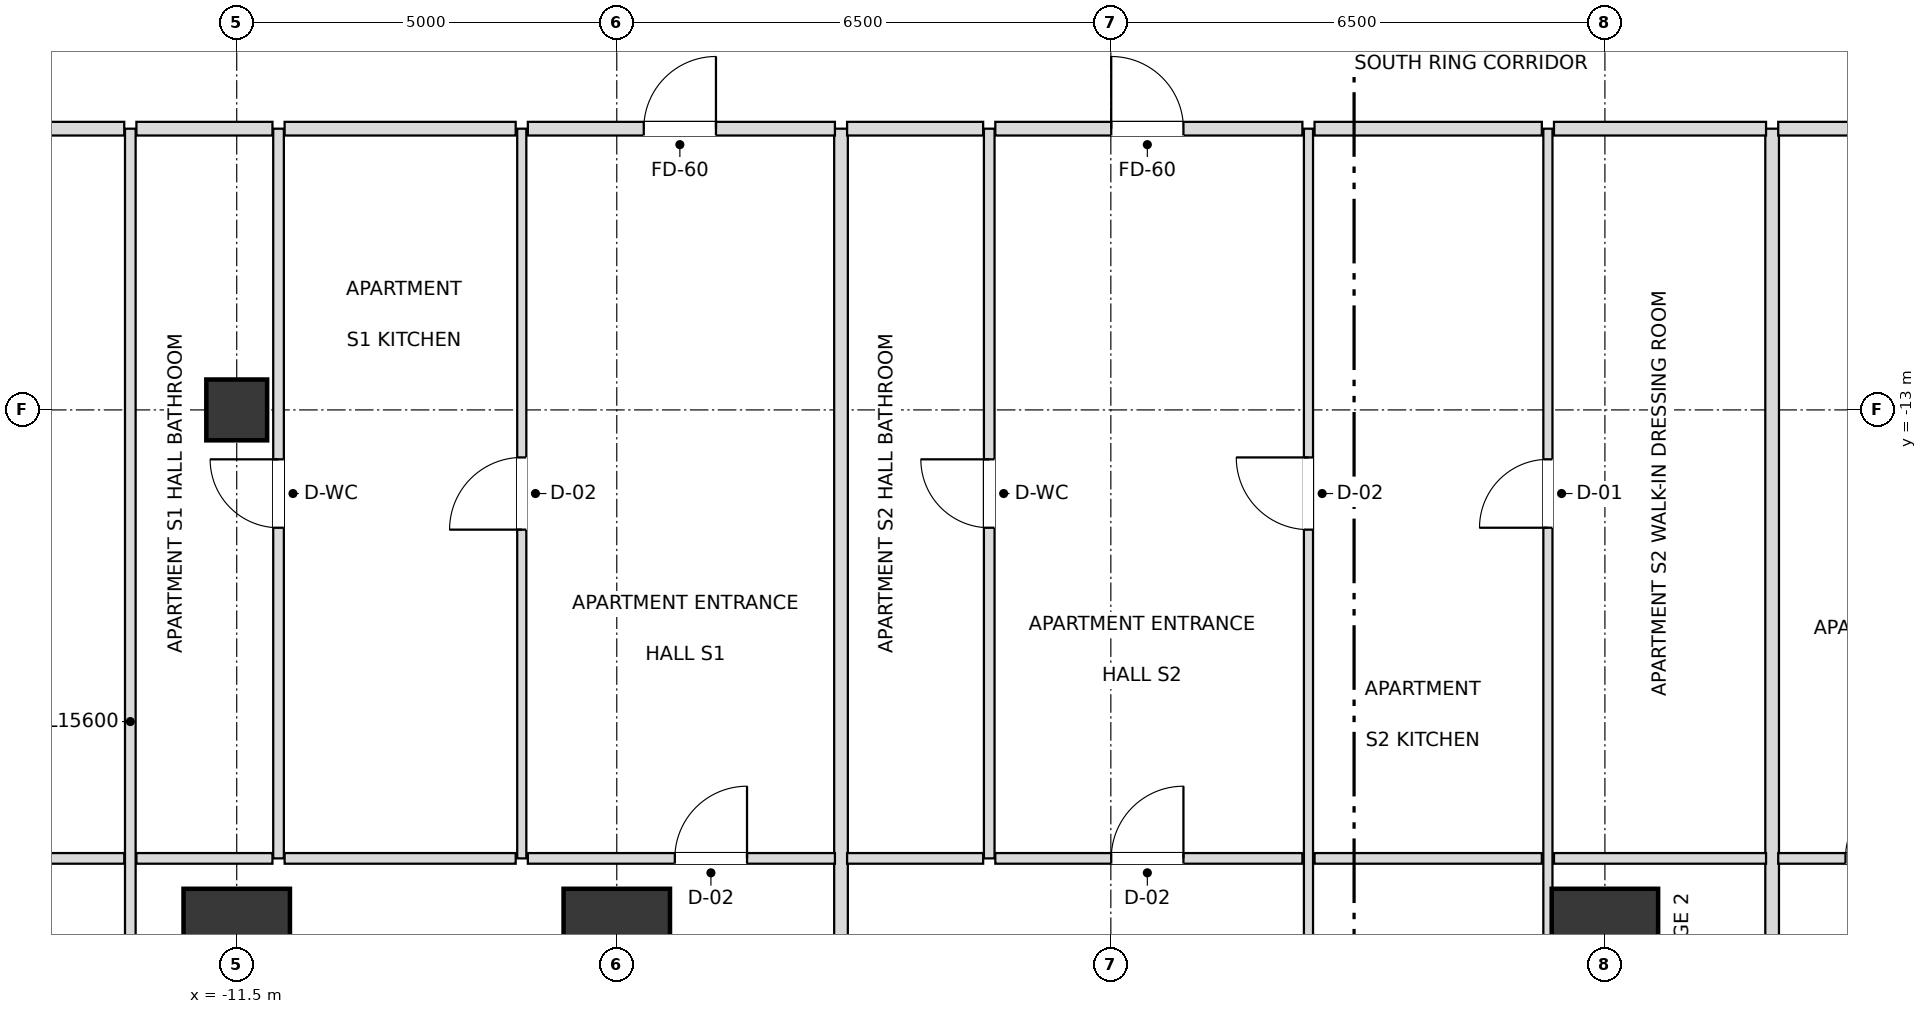
"""IFC4 building model, lengths in metres.
Left out: names, types, materials, properties, quantities, classifications, styles, units other than length and angle.
Written with IfcOpenShell. Run it as: python <this file> out.ifc"""

import sys

from ifc_helpers import new_model, si_unit, direction, frame, frame_2d, origin, origin_2d, place, context, subcontext, project, spatial, rectangle, extrude, element, fill, save


model = new_model("IFC4")
c1 = context("Model", 3, precision=1e-05, world=origin(), true_north=direction((0.0, 1.0)))
c2 = subcontext(c1, "Body", "Model", "MODEL_VIEW")
j1 = project(units=[si_unit("LENGTHUNIT", "METRE"), si_unit("PLANEANGLEUNIT", "RADIAN")], contexts=[c1])
p1 = place(None, origin())
s1 = spatial("IfcSite", under=j1, at=p1, CompositionType="ELEMENT")
p2 = place(p1, origin())
s2 = spatial("IfcBuilding", under=s1, at=p2, CompositionType="ELEMENT")
p3 = place(p2, frame((0.0, 0.0, 39.6)))
s3 = spatial("IfcBuildingStorey", under=s2, at=p3, CompositionType="ELEMENT", Elevation=39.6)
for number, where, z_axis, x_axis in (
    (1, (-11.5, -20.0, 0.0), (0.0, 0.0, 1.0), (1.0, 0.0, 0.0)),
    (2, (-6.5, -20.0, 0.0), (0.0, 0.0, 1.0), (1.0, 0.0, 0.0)),
    (3, (6.5, -20.0, 0.0), (0.0, 0.0, 1.0), (1.0, 0.0, 0.0)),
):
    element("IfcColumn", number, at=place(p3, frame(where, z_axis=z_axis, x_axis=x_axis)), inside=s3, PredefinedType="USERDEFINED", context=c2, shape_type="SweptSolid", body=[
        extrude(rectangle(XDim=1.4, YDim=1.4, at=origin_2d()), origin(), (0.0, 0.0, 1.0), 3.6),
    ])
p4 = place(p3, frame((-11.5, -13.0, 0.0), z_axis=(0.0, 0.0, 1.0), x_axis=(1.0, 0.0, 0.0)))
e4 = element("IfcColumn", 4, at=p4, inside=s3, PredefinedType="COLUMN", context=c2, shape_type="SweptSolid", body=[
    extrude(rectangle(XDim=0.8, YDim=0.8, at=origin_2d()), origin(), (0.0, 0.0, 1.0), 3.6),
])
p5 = place(p3, frame((-12.9, -24.9, 0.0), z_axis=(0.0, 0.0, 1.0), x_axis=(0.0, 1.0, 0.0)))
e5 = element("IfcWall", 5, at=p5, inside=s3, PredefinedType="PARTITIONING", context=c2, shape_type="SweptSolid", body=[
    extrude(rectangle(XDim=15.6, YDim=0.14, at=frame_2d((7.8, 0.0))), origin(), (0.0, 0.0, 1.0), 2.736),
])
p6 = place(p5, frame((2.55, 0.0, 0.0)))
e6 = element("IfcOpeningElement", 6, at=p6, cuts=e5, PredefinedType="OPENING", context=c2, shape_type="SweptSolid", body=[
    extrude(rectangle(XDim=0.9, YDim=2.1, at=frame_2d((0.45, 1.05))), frame((0.0, 0.08, 0.0), z_axis=(0.0, -1.0, 0.0), x_axis=(1.0, 0.0, 0.0)), (0.0, 0.0, 1.0), 0.16),
])
p7 = place(p3, frame((-10.95, -18.9, 0.0), z_axis=(0.0, 0.0, 1.0), x_axis=(0.0, 1.0, 0.0)))
e7 = element("IfcWall", 7, at=p7, inside=s3, PredefinedType="PARTITIONING", context=c2, shape_type="SweptSolid", body=[
    extrude(rectangle(XDim=9.6, YDim=0.14, at=frame_2d((4.8, 0.0))), origin(), (0.0, 0.0, 1.0), 2.816),
])
p8 = place(p7, frame((4.35, 0.0, 0.0)))
e8 = element("IfcOpeningElement", 8, at=p8, cuts=e7, PredefinedType="OPENING", context=c2, shape_type="SweptSolid", body=[
    extrude(rectangle(XDim=0.9, YDim=2.1, at=frame_2d((0.45, 1.05))), frame((0.0, 0.08, 0.0), z_axis=(0.0, -1.0, 0.0), x_axis=(1.0, 0.0, 0.0)), (0.0, 0.0, 1.0), 0.16),
])
p9 = place(p3, frame((-7.75, -18.9, 0.0), z_axis=(0.0, 0.0, 1.0), x_axis=(0.0, 1.0, 0.0)))
e9 = element("IfcWall", 9, at=p9, inside=s3, PredefinedType="PARTITIONING", context=c2, shape_type="SweptSolid", body=[
    extrude(rectangle(XDim=9.6, YDim=0.12, at=frame_2d((4.8, 0.0))), origin(), (0.0, 0.0, 1.0), 2.816),
])
p10 = place(p9, frame((4.325, 0.0, 0.0)))
e10 = element("IfcOpeningElement", 10, at=p10, cuts=e9, PredefinedType="OPENING", context=c2, shape_type="SweptSolid", body=[
    extrude(rectangle(XDim=0.95, YDim=2.1, at=frame_2d((0.475, 1.05))), frame((0.0, 0.07, 0.0), z_axis=(0.0, -1.0, 0.0), x_axis=(1.0, 0.0, 0.0)), (0.0, 0.0, 1.0), 0.14),
])
p11 = place(p3, frame((-3.55, -24.9, 0.0), z_axis=(0.0, 0.0, 1.0), x_axis=(0.0, 1.0, 0.0)))
e11 = element("IfcWall", 11, at=p11, inside=s3, PredefinedType="PARTITIONING", context=c2, shape_type="SweptSolid", body=[
    extrude(rectangle(XDim=15.6, YDim=0.18, at=frame_2d((7.8, 0.0))), origin(), (0.0, 0.0, 1.0), 2.816),
])
p12 = place(p3, frame((-1.6, -18.9, 0.0), z_axis=(0.0, 0.0, 1.0), x_axis=(0.0, 1.0, 0.0)))
e12 = element("IfcWall", 12, at=p12, inside=s3, PredefinedType="PARTITIONING", context=c2, shape_type="SweptSolid", body=[
    extrude(rectangle(XDim=9.6, YDim=0.14, at=frame_2d((4.8, 0.0))), origin(), (0.0, 0.0, 1.0), 2.948),
])
p13 = place(p12, frame((4.35, 0.0, 0.0)))
e13 = element("IfcOpeningElement", 13, at=p13, cuts=e12, PredefinedType="OPENING", context=c2, shape_type="SweptSolid", body=[
    extrude(rectangle(XDim=0.9, YDim=2.1, at=frame_2d((0.45, 1.05))), frame((0.0, 0.08, 0.0), z_axis=(0.0, -1.0, 0.0), x_axis=(1.0, 0.0, 0.0)), (0.0, 0.0, 1.0), 0.16),
])
p14 = place(p3, frame((2.6, -24.9, 0.0), z_axis=(0.0, 0.0, 1.0), x_axis=(0.0, 1.0, 0.0)))
e14 = element("IfcWall", 14, at=p14, inside=s3, PredefinedType="PARTITIONING", context=c2, shape_type="SweptSolid", body=[
    extrude(rectangle(XDim=15.6, YDim=0.12, at=frame_2d((7.8, 0.0))), origin(), (0.0, 0.0, 1.0), 2.816),
])
p15 = place(p14, frame((10.325, 0.0, 0.0)))
e15 = element("IfcOpeningElement", 15, at=p15, cuts=e14, PredefinedType="OPENING", context=c2, shape_type="SweptSolid", body=[
    extrude(rectangle(XDim=0.95, YDim=2.1, at=frame_2d((0.475, 1.05))), frame((0.0, 0.07, 0.0), z_axis=(0.0, -1.0, 0.0), x_axis=(1.0, 0.0, 0.0)), (0.0, 0.0, 1.0), 0.14),
])
p16 = place(p14, frame((2.55, 0.0, 0.0)))
e16 = element("IfcOpeningElement", 16, at=p16, cuts=e14, PredefinedType="OPENING", context=c2, shape_type="SweptSolid", body=[
    extrude(rectangle(XDim=0.9, YDim=2.1, at=frame_2d((0.45, 1.05))), frame((0.0, 0.07, 0.0), z_axis=(0.0, -1.0, 0.0), x_axis=(1.0, 0.0, 0.0)), (0.0, 0.0, 1.0), 0.14),
])
p17 = place(p3, frame((5.75, -24.9, 0.0), z_axis=(0.0, 0.0, 1.0), x_axis=(0.0, 1.0, 0.0)))
e17 = element("IfcWall", 17, at=p17, inside=s3, PredefinedType="PARTITIONING", context=c2, shape_type="SweptSolid", body=[
    extrude(rectangle(XDim=15.6, YDim=0.12, at=frame_2d((7.8, 0.0))), origin(), (0.0, 0.0, 1.0), 2.816),
])
p18 = place(p17, frame((10.35, 0.0, 0.0)))
e18 = element("IfcOpeningElement", 18, at=p18, cuts=e17, PredefinedType="OPENING", context=c2, shape_type="SweptSolid", body=[
    extrude(rectangle(XDim=0.9, YDim=2.1, at=frame_2d((0.45, 1.05))), frame((0.0, 0.07, 0.0), z_axis=(0.0, -1.0, 0.0), x_axis=(1.0, 0.0, 0.0)), (0.0, 0.0, 1.0), 0.14),
])
p19 = place(p17, frame((2.55, 0.0, 0.0)))
e19 = element("IfcOpeningElement", 19, at=p19, cuts=e17, PredefinedType="OPENING", context=c2, shape_type="SweptSolid", body=[
    extrude(rectangle(XDim=0.9, YDim=2.1, at=frame_2d((0.45, 1.05))), frame((0.0, 0.07, 0.0), z_axis=(0.0, -1.0, 0.0), x_axis=(1.0, 0.0, 0.0)), (0.0, 0.0, 1.0), 0.14),
])
p20 = place(p3, frame((8.7, -24.9, 0.0), z_axis=(0.0, 0.0, 1.0), x_axis=(0.0, 1.0, 0.0)))
e20 = element("IfcWall", 20, at=p20, inside=s3, PredefinedType="PARTITIONING", context=c2, shape_type="SweptSolid", body=[
    extrude(rectangle(XDim=15.6, YDim=0.18, at=frame_2d((7.8, 0.0))), origin(), (0.0, 0.0, 1.0), 2.816),
])
p21 = place(p3, frame((-18.32, -18.9, 0.0), z_axis=(0.0, 0.0, 1.0), x_axis=(1.0, 0.0, 0.0)))
e21 = element("IfcWall", 21, at=p21, inside=s3, PredefinedType="PARTITIONING", context=c2, shape_type="SweptSolid", body=[
    extrude(rectangle(XDim=5.34, YDim=0.14, at=frame_2d((2.67, 0.0))), origin(), (0.0, 0.0, 1.0), 2.736),
])
p22 = place(p21, frame((2.21, 0.0, 0.0)))
e22 = element("IfcOpeningElement", 22, at=p22, cuts=e21, PredefinedType="OPENING", context=c2, shape_type="SweptSolid", body=[
    extrude(rectangle(XDim=0.9, YDim=2.1, at=frame_2d((0.45, 1.05))), frame((0.0, 0.08, 0.0), z_axis=(0.0, -1.0, 0.0), x_axis=(1.0, 0.0, 0.0)), (0.0, 0.0, 1.0), 0.16),
])
p23 = place(p3, frame((-12.82, -18.9, 0.0), z_axis=(0.0, 0.0, 1.0), x_axis=(1.0, 0.0, 0.0)))
e23 = element("IfcWall", 23, at=p23, inside=s3, PredefinedType="PARTITIONING", context=c2, shape_type="SweptSolid", body=[
    extrude(rectangle(XDim=1.79, YDim=0.14, at=frame_2d((0.895, 0.0))), origin(), (0.0, 0.0, 1.0), 2.736),
])
p24 = place(p3, frame((-10.87, -18.9, 0.0), z_axis=(0.0, 0.0, 1.0), x_axis=(1.0, 0.0, 0.0)))
e24 = element("IfcWall", 24, at=p24, inside=s3, PredefinedType="PARTITIONING", context=c2, shape_type="SweptSolid", body=[
    extrude(rectangle(XDim=3.04, YDim=0.14, at=frame_2d((1.52, 0.0))), origin(), (0.0, 0.0, 1.0), 3.38),
])
p25 = place(p3, frame((-7.67, -18.9, 0.0), z_axis=(0.0, 0.0, 1.0), x_axis=(1.0, 0.0, 0.0)))
e25 = element("IfcWall", 25, at=p25, inside=s3, PredefinedType="PARTITIONING", context=c2, shape_type="SweptSolid", body=[
    extrude(rectangle(XDim=4.04, YDim=0.14, at=frame_2d((2.02, 0.0))), origin(), (0.0, 0.0, 1.0), 2.816),
])
p26 = place(p25, frame((1.934, 0.0, 0.0)))
e26 = element("IfcOpeningElement", 26, at=p26, cuts=e25, PredefinedType="OPENING", context=c2, shape_type="SweptSolid", body=[
    extrude(rectangle(XDim=0.95, YDim=2.1, at=frame_2d((0.475, 1.05))), frame((0.0, 0.08, 0.0), z_axis=(0.0, -1.0, 0.0), x_axis=(1.0, 0.0, 0.0)), (0.0, 0.0, 1.0), 0.16),
])
p27 = place(p3, frame((-3.47, -18.9, 0.0), z_axis=(0.0, 0.0, 1.0), x_axis=(1.0, 0.0, 0.0)))
e27 = element("IfcWall", 27, at=p27, inside=s3, PredefinedType="PARTITIONING", context=c2, shape_type="SweptSolid", body=[
    extrude(rectangle(XDim=1.79, YDim=0.14, at=frame_2d((0.895, 0.0))), origin(), (0.0, 0.0, 1.0), 3.38),
])
p28 = place(p3, frame((-1.52, -18.9, 0.0), z_axis=(0.0, 0.0, 1.0), x_axis=(1.0, 0.0, 0.0)))
e28 = element("IfcWall", 28, at=p28, inside=s3, PredefinedType="PARTITIONING", context=c2, shape_type="SweptSolid", body=[
    extrude(rectangle(XDim=4.04, YDim=0.14, at=frame_2d((2.02, 0.0))), origin(), (0.0, 0.0, 1.0), 3.38),
])
p29 = place(p28, frame((1.525, 0.0, 0.0)))
e29 = element("IfcOpeningElement", 29, at=p29, cuts=e28, PredefinedType="OPENING", context=c2, shape_type="SweptSolid", body=[
    extrude(rectangle(XDim=0.95, YDim=2.1, at=frame_2d((0.475, 1.05))), frame((0.0, 0.08, 0.0), z_axis=(0.0, -1.0, 0.0), x_axis=(1.0, 0.0, 0.0)), (0.0, 0.0, 1.0), 0.16),
])
p30 = place(p3, frame((2.68, -18.9, 0.0), z_axis=(0.0, 0.0, 1.0), x_axis=(1.0, 0.0, 0.0)))
e30 = element("IfcWall", 30, at=p30, inside=s3, PredefinedType="PARTITIONING", context=c2, shape_type="SweptSolid", body=[
    extrude(rectangle(XDim=2.99, YDim=0.14, at=frame_2d((1.495, 0.0))), origin(), (0.0, 0.0, 1.0), 3.38),
])
p31 = place(p3, frame((5.83, -18.9, 0.0), z_axis=(0.0, 0.0, 1.0), x_axis=(1.0, 0.0, 0.0)))
e31 = element("IfcWall", 31, at=p31, inside=s3, PredefinedType="PARTITIONING", context=c2, shape_type="SweptSolid", body=[
    extrude(rectangle(XDim=2.79, YDim=0.14, at=frame_2d((1.395, 0.0))), origin(), (0.0, 0.0, 1.0), 2.816),
])
p32 = place(p3, frame((8.78, -18.9, 0.0), z_axis=(0.0, 0.0, 1.0), x_axis=(1.0, 0.0, 0.0)))
e32 = element("IfcWall", 32, at=p32, inside=s3, PredefinedType="PARTITIONING", context=c2, shape_type="SweptSolid", body=[
    extrude(rectangle(XDim=3.74, YDim=0.14, at=frame_2d((1.87, 0.0))), origin(), (0.0, 0.0, 1.0), 2.736),
])
p33 = place(p32, frame((0.885, 0.0, 0.0)))
e33 = element("IfcOpeningElement", 33, at=p33, cuts=e32, PredefinedType="OPENING", context=c2, shape_type="SweptSolid", body=[
    extrude(rectangle(XDim=0.95, YDim=2.1, at=frame_2d((0.475, 1.05))), frame((0.0, 0.08, 0.0), z_axis=(0.0, -1.0, 0.0), x_axis=(1.0, 0.0, 0.0)), (0.0, 0.0, 1.0), 0.16),
])
p34 = place(p3, frame((-18.32, -9.3, 0.0), z_axis=(0.0, 0.0, 1.0), x_axis=(1.0, 0.0, 0.0)))
e34 = element("IfcWall", 34, at=p34, inside=s3, PredefinedType="PARTITIONING", context=c2, shape_type="SweptSolid", body=[
    extrude(rectangle(XDim=5.34, YDim=0.18, at=frame_2d((2.67, 0.0))), origin(), (0.0, 0.0, 1.0), 2.816),
])
p35 = place(p3, frame((-12.82, -9.3, 0.0), z_axis=(0.0, 0.0, 1.0), x_axis=(1.0, 0.0, 0.0)))
e35 = element("IfcWall", 35, at=p35, inside=s3, PredefinedType="PARTITIONING", context=c2, shape_type="SweptSolid", body=[
    extrude(rectangle(XDim=1.79, YDim=0.18, at=frame_2d((0.895, 0.0))), origin(), (0.0, 0.0, 1.0), 3.38),
])
p36 = place(p3, frame((-10.87, -9.3, 0.0), z_axis=(0.0, 0.0, 1.0), x_axis=(1.0, 0.0, 0.0)))
e36 = element("IfcWall", 36, at=p36, inside=s3, PredefinedType="PARTITIONING", context=c2, shape_type="SweptSolid", body=[
    extrude(rectangle(XDim=3.04, YDim=0.18, at=frame_2d((1.52, 0.0))), origin(), (0.0, 0.0, 1.0), 3.38),
])
p37 = place(p3, frame((-7.67, -9.3, 0.0), z_axis=(0.0, 0.0, 1.0), x_axis=(1.0, 0.0, 0.0)))
e37 = element("IfcWall", 37, at=p37, inside=s3, PredefinedType="PARTITIONING", context=c2, shape_type="SweptSolid", body=[
    extrude(rectangle(XDim=4.04, YDim=0.18, at=frame_2d((2.02, 0.0))), origin(), (0.0, 0.0, 1.0), 2.816),
])
p38 = place(p37, frame((1.525, 0.0, 0.0)))
e38 = element("IfcOpeningElement", 38, at=p38, cuts=e37, PredefinedType="OPENING", context=c2, shape_type="SweptSolid", body=[
    extrude(rectangle(XDim=0.95, YDim=2.15, at=frame_2d((0.475, 1.075))), frame((0.0, 0.1, 0.0), z_axis=(0.0, -1.0, 0.0), x_axis=(1.0, 0.0, 0.0)), (0.0, 0.0, 1.0), 0.2),
])
p39 = place(p3, frame((-3.47, -9.3, 0.0), z_axis=(0.0, 0.0, 1.0), x_axis=(1.0, 0.0, 0.0)))
e39 = element("IfcWall", 39, at=p39, inside=s3, PredefinedType="PARTITIONING", context=c2, shape_type="SweptSolid", body=[
    extrude(rectangle(XDim=1.79, YDim=0.18, at=frame_2d((0.895, 0.0))), origin(), (0.0, 0.0, 1.0), 3.38),
])
p40 = place(p3, frame((-1.52, -9.3, 0.0), z_axis=(0.0, 0.0, 1.0), x_axis=(1.0, 0.0, 0.0)))
e40 = element("IfcWall", 40, at=p40, inside=s3, PredefinedType="PARTITIONING", context=c2, shape_type="SweptSolid", body=[
    extrude(rectangle(XDim=4.04, YDim=0.18, at=frame_2d((2.02, 0.0))), origin(), (0.0, 0.0, 1.0), 3.38),
])
p41 = place(p40, frame((1.525, 0.0, 0.0)))
e41 = element("IfcOpeningElement", 41, at=p41, cuts=e40, PredefinedType="OPENING", context=c2, shape_type="SweptSolid", body=[
    extrude(rectangle(XDim=0.95, YDim=2.15, at=frame_2d((0.475, 1.075))), frame((0.0, 0.1, 0.0), z_axis=(0.0, -1.0, 0.0), x_axis=(1.0, 0.0, 0.0)), (0.0, 0.0, 1.0), 0.2),
])
p42 = place(p3, frame((2.68, -9.3, 0.0), z_axis=(0.0, 0.0, 1.0), x_axis=(1.0, 0.0, 0.0)))
e42 = element("IfcWall", 42, at=p42, inside=s3, PredefinedType="PARTITIONING", context=c2, shape_type="SweptSolid", body=[
    extrude(rectangle(XDim=2.99, YDim=0.18, at=frame_2d((1.495, 0.0))), origin(), (0.0, 0.0, 1.0), 3.38),
])
p43 = place(p3, frame((5.83, -9.3, 0.0), z_axis=(0.0, 0.0, 1.0), x_axis=(1.0, 0.0, 0.0)))
e43 = element("IfcWall", 43, at=p43, inside=s3, PredefinedType="PARTITIONING", context=c2, shape_type="SweptSolid", body=[
    extrude(rectangle(XDim=2.79, YDim=0.18, at=frame_2d((1.395, 0.0))), origin(), (0.0, 0.0, 1.0), 2.816),
])
p44 = place(p3, frame((8.78, -9.3, 0.0), z_axis=(0.0, 0.0, 1.0), x_axis=(1.0, 0.0, 0.0)))
e44 = element("IfcWall", 44, at=p44, inside=s3, PredefinedType="PARTITIONING", context=c2, shape_type="SweptSolid", body=[
    extrude(rectangle(XDim=5.19, YDim=0.18, at=frame_2d((2.595, 0.0))), origin(), (0.0, 0.0, 1.0), 3.38),
])
p45 = place(p44, frame((0.995, 0.0, 0.0)))
e45 = element("IfcOpeningElement", 45, at=p45, cuts=e44, PredefinedType="OPENING", context=c2, shape_type="SweptSolid", body=[
    extrude(rectangle(XDim=0.95, YDim=2.15, at=frame_2d((0.475, 1.075))), frame((0.0, 0.1, 0.0), z_axis=(0.0, -1.0, 0.0), x_axis=(1.0, 0.0, 0.0)), (0.0, 0.0, 1.0), 0.2),
])
p46 = place(p38, origin())
e46 = element("IfcDoor", 46, at=p46, inside=s3, OperationType="SINGLE_SWING_RIGHT", PredefinedType="DOOR", context=c2, shape_type="SweptSolid", body=[
    extrude(rectangle(XDim=0.95, YDim=2.15, at=frame_2d((0.475, 1.075))), frame((0.0, 0.025, 0.0), z_axis=(0.0, -1.0, 0.0), x_axis=(1.0, 0.0, 0.0)), (0.0, 0.0, 1.0), 0.05),
])
fill(e38, e46)
p47 = place(p10, origin())
e47 = element("IfcDoor", 47, at=p47, inside=s3, OperationType="SINGLE_SWING_LEFT", PredefinedType="DOOR", context=c2, shape_type="SweptSolid", body=[
    extrude(rectangle(XDim=0.95, YDim=2.1, at=frame_2d((0.475, 1.05))), frame((0.0, 0.025, 0.0), z_axis=(0.0, -1.0, 0.0), x_axis=(1.0, 0.0, 0.0)), (0.0, 0.0, 1.0), 0.05),
])
fill(e10, e47)
p48 = place(p8, origin())
e48 = element("IfcDoor", 48, at=p48, inside=s3, OperationType="SINGLE_SWING_RIGHT", PredefinedType="DOOR", context=c2, shape_type="SweptSolid", body=[
    extrude(rectangle(XDim=0.9, YDim=2.1, at=frame_2d((0.45, 1.05))), frame((0.0, 0.025, 0.0), z_axis=(0.0, -1.0, 0.0), x_axis=(1.0, 0.0, 0.0)), (0.0, 0.0, 1.0), 0.05),
])
fill(e8, e48)
p49 = place(p26, origin())
e49 = element("IfcDoor", 49, at=p49, inside=s3, OperationType="SINGLE_SWING_RIGHT", PredefinedType="DOOR", context=c2, shape_type="SweptSolid", body=[
    extrude(rectangle(XDim=0.95, YDim=2.1, at=frame_2d((0.475, 1.05))), frame((0.0, 0.025, 0.0), z_axis=(0.0, -1.0, 0.0), x_axis=(1.0, 0.0, 0.0)), (0.0, 0.0, 1.0), 0.05),
])
fill(e26, e49)
p50 = place(p13, origin())
e50 = element("IfcDoor", 50, at=p50, inside=s3, OperationType="SINGLE_SWING_RIGHT", PredefinedType="DOOR", context=c2, shape_type="SweptSolid", body=[
    extrude(rectangle(XDim=0.9, YDim=2.1, at=frame_2d((0.45, 1.05))), frame((0.0, 0.025, 0.0), z_axis=(0.0, -1.0, 0.0), x_axis=(1.0, 0.0, 0.0)), (0.0, 0.0, 1.0), 0.05),
])
fill(e13, e50)
p51 = place(p41, origin())
e51 = element("IfcDoor", 51, at=p51, inside=s3, OperationType="SINGLE_SWING_LEFT", PredefinedType="DOOR", context=c2, shape_type="SweptSolid", body=[
    extrude(rectangle(XDim=0.95, YDim=2.15, at=frame_2d((0.475, 1.075))), frame((0.0, 0.025, 0.0), z_axis=(0.0, -1.0, 0.0), x_axis=(1.0, 0.0, 0.0)), (0.0, 0.0, 1.0), 0.05),
])
fill(e41, e51)
p52 = place(p15, origin())
e52 = element("IfcDoor", 52, at=p52, inside=s3, OperationType="SINGLE_SWING_RIGHT", PredefinedType="DOOR", context=c2, shape_type="SweptSolid", body=[
    extrude(rectangle(XDim=0.95, YDim=2.1, at=frame_2d((0.475, 1.05))), frame((0.0, 0.025, 0.0), z_axis=(0.0, -1.0, 0.0), x_axis=(1.0, 0.0, 0.0)), (0.0, 0.0, 1.0), 0.05),
])
fill(e15, e52)
p53 = place(p18, origin())
e53 = element("IfcDoor", 53, at=p53, inside=s3, OperationType="SINGLE_SWING_LEFT", PredefinedType="DOOR", context=c2, shape_type="SweptSolid", body=[
    extrude(rectangle(XDim=0.9, YDim=2.1, at=frame_2d((0.45, 1.05))), frame((0.0, 0.025, 0.0), z_axis=(0.0, -1.0, 0.0), x_axis=(1.0, 0.0, 0.0)), (0.0, 0.0, 1.0), 0.05),
])
fill(e18, e53)
p54 = place(p29, origin())
e54 = element("IfcDoor", 54, at=p54, inside=s3, OperationType="SINGLE_SWING_RIGHT", PredefinedType="DOOR", context=c2, shape_type="SweptSolid", body=[
    extrude(rectangle(XDim=0.95, YDim=2.1, at=frame_2d((0.475, 1.05))), frame((0.0, 0.025, 0.0), z_axis=(0.0, -1.0, 0.0), x_axis=(1.0, 0.0, 0.0)), (0.0, 0.0, 1.0), 0.05),
])
fill(e29, e54)
p55 = place(p33, origin())
e55 = element("IfcDoor", 55, at=p55, inside=s3, OperationType="SINGLE_SWING_RIGHT", PredefinedType="DOOR", context=c2, shape_type="SweptSolid", body=[
    extrude(rectangle(XDim=0.95, YDim=2.1, at=frame_2d((0.475, 1.05))), frame((0.0, 0.025, 0.0), z_axis=(0.0, -1.0, 0.0), x_axis=(1.0, 0.0, 0.0)), (0.0, 0.0, 1.0), 0.05),
])
fill(e33, e55)
save(model, sys.argv[1])
